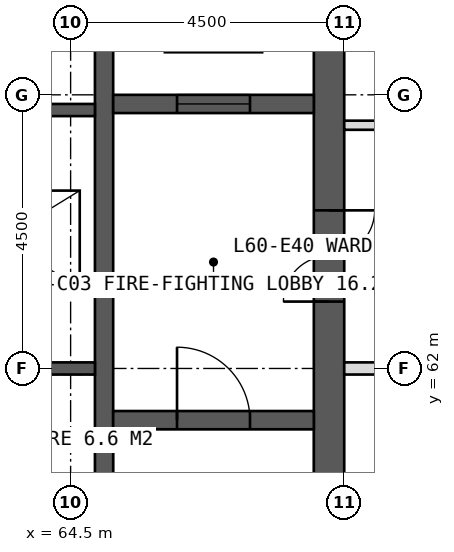
"""IFC4 building model, lengths in metres.
Left out: names, types, materials, properties, quantities, classifications, styles, units other than length and angle.
Written with IfcOpenShell. Run it as: python <this file> out.ifc"""

import sys

from ifc_helpers import new_model, si_unit, direction, frame, frame_2d, origin, place, context, subcontext, project, spatial, rectangle, extrude, element, fill, save


model = new_model("IFC4")
c1 = context("Model", 3, precision=1e-05, world=origin(), true_north=direction((0.0, 1.0)))
c2 = subcontext(c1, "Body", "Model", "MODEL_VIEW")
j1 = project(units=[si_unit("LENGTHUNIT", "METRE"), si_unit("PLANEANGLEUNIT", "RADIAN")], contexts=[c1])
p1 = place(None, origin())
s1 = spatial("IfcSite", under=j1, at=p1, CompositionType="ELEMENT")
p2 = place(p1, origin())
s2 = spatial("IfcBuilding", under=s1, at=p2, CompositionType="ELEMENT")
p3 = place(p2, frame((0.0, 0.0, 250.0)))
s3 = spatial("IfcBuildingStorey", under=s2, at=p3, CompositionType="ELEMENT", Elevation=250.0)
p4 = place(p3, frame((68.75, 53.5, 0.0), z_axis=(0.0, 0.0, 1.0), x_axis=(0.0, 1.0, 0.0)))
e1 = element("IfcWall", 1, at=p4, inside=s3, PredefinedType="SHEAR", context=c2, shape_type="SweptSolid", body=[
    extrude(rectangle(XDim=17.0, YDim=0.5, at=frame_2d((8.5, 0.0))), origin(), (0.0, 0.0, 1.0), 4.0),
])
p5 = place(p4, frame((9.6, 0.0, 0.0)))
e2 = element("IfcOpeningElement", 2, at=p5, cuts=e1, PredefinedType="OPENING", context=c2, shape_type="SweptSolid", body=[
    extrude(rectangle(XDim=1.5, YDim=2.2, at=frame_2d((0.75, 1.1))), frame((0.0, 0.26, 0.0), z_axis=(0.0, -1.0, 0.0), x_axis=(1.0, 0.0, 0.0)), (0.0, 0.0, 1.0), 0.52),
])
p6 = place(p3, frame((65.05, 53.5, 0.0), z_axis=(0.0, 0.0, 1.0), x_axis=(0.0, 1.0, 0.0)))
e3 = element("IfcWall", 3, at=p6, inside=s3, PredefinedType="SHEAR", context=c2, shape_type="SweptSolid", body=[
    extrude(rectangle(XDim=17.0, YDim=0.3, at=frame_2d((8.5, 0.0))), origin(), (0.0, 0.0, 1.0), 4.0),
])
for number, where, z_axis, x_axis in (
    (4, (61.85, 62.0, 0.0), (0.0, 0.0, 1.0), (1.0, 0.0, 0.0)),
    (5, (61.85, 66.25, 0.0), (0.0, 0.0, 1.0), (1.0, 0.0, 0.0)),
):
    element("IfcWall", number, at=place(p3, frame(where, z_axis=z_axis, x_axis=x_axis)), inside=s3, PredefinedType="SHEAR", context=c2, shape_type="SweptSolid", body=[
        extrude(rectangle(XDim=3.05, YDim=0.2, at=frame_2d((1.525, 0.0))), origin(), (0.0, 0.0, 1.0), 4.0),
    ])
p7 = place(p3, frame((65.2, 61.15, 0.0), z_axis=(0.0, 0.0, 1.0), x_axis=(1.0, 0.0, 0.0)))
e6 = element("IfcWall", 6, at=p7, inside=s3, PredefinedType="SHEAR", context=c2, shape_type="SweptSolid", body=[
    extrude(rectangle(XDim=3.3, YDim=0.3, at=frame_2d((1.65, 0.0))), origin(), (0.0, 0.0, 1.0), 4.0),
])
p8 = place(p7, frame((1.05, 0.0, 0.0)))
e7 = element("IfcOpeningElement", 7, at=p8, cuts=e6, PredefinedType="OPENING", context=c2, shape_type="SweptSolid", body=[
    extrude(rectangle(XDim=1.2, YDim=2.1, at=frame_2d((0.6, 1.05))), frame((0.0, 0.16, 0.0), z_axis=(0.0, -1.0, 0.0), x_axis=(1.0, 0.0, 0.0)), (0.0, 0.0, 1.0), 0.32),
])
p9 = place(p3, frame((65.2, 66.35, 0.0), z_axis=(0.0, 0.0, 1.0), x_axis=(1.0, 0.0, 0.0)))
e8 = element("IfcWall", 8, at=p9, inside=s3, PredefinedType="SHEAR", context=c2, shape_type="SweptSolid", body=[
    extrude(rectangle(XDim=3.3, YDim=0.3, at=frame_2d((1.65, 0.0))), origin(), (0.0, 0.0, 1.0), 4.0),
])
p10 = place(p9, frame((1.05, 0.0, 0.0)))
e9 = element("IfcOpeningElement", 9, at=p10, cuts=e8, PredefinedType="OPENING", context=c2, shape_type="SweptSolid", body=[
    extrude(rectangle(XDim=1.2, YDim=2.2, at=frame_2d((0.6, 1.1))), frame((0.0, 0.16, 0.0), z_axis=(0.0, -1.0, 0.0), x_axis=(1.0, 0.0, 0.0)), (0.0, 0.0, 1.0), 0.32),
])
p11 = place(p3, frame((69.0, 66.0, 0.0), z_axis=(0.0, 0.0, 1.0), x_axis=(1.0, 0.0, 0.0)))
e10 = element("IfcWall", 10, at=p11, inside=s3, PredefinedType="PARTITIONING", context=c2, shape_type="SweptSolid", body=[
    extrude(rectangle(XDim=1.5, YDim=0.15, at=frame_2d((0.75, 0.0))), origin(), (0.0, 0.0, 1.0), 3.75),
])
p12 = place(p3, frame((69.0, 62.0, 0.0), z_axis=(0.0, 0.0, 1.0), x_axis=(1.0, 0.0, 0.0)))
e11 = element("IfcWall", 11, at=p12, inside=s3, PredefinedType="SOLIDWALL", context=c2, shape_type="SweptSolid", body=[
    extrude(rectangle(XDim=1.5, YDim=0.2, at=frame_2d((0.75, 0.0))), origin(), (0.0, 0.0, 1.0), 2.75),
])
p13 = place(p5, origin())
e12 = element("IfcDoor", 12, at=p13, inside=s3, OperationType="DOUBLE_DOOR_SINGLE_SWING", PredefinedType="DOOR", context=c2, shape_type="SweptSolid", body=[
    extrude(rectangle(XDim=1.5, YDim=2.2, at=frame_2d((0.75, 1.1))), frame((0.0, 0.025, 0.0), z_axis=(0.0, -1.0, 0.0), x_axis=(1.0, 0.0, 0.0)), (0.0, 0.0, 1.0), 0.05),
])
fill(e2, e12)
p14 = place(p8, origin())
e13 = element("IfcDoor", 13, at=p14, inside=s3, OperationType="SINGLE_SWING_LEFT", PredefinedType="DOOR", context=c2, shape_type="SweptSolid", body=[
    extrude(rectangle(XDim=1.2, YDim=2.1, at=frame_2d((0.6, 1.05))), frame((0.0, 0.025, 0.0), z_axis=(0.0, -1.0, 0.0), x_axis=(1.0, 0.0, 0.0)), (0.0, 0.0, 1.0), 0.05),
])
fill(e7, e13)
p15 = place(p10, origin())
e14 = element("IfcDoor", 14, at=p15, inside=s3, OperationType="SLIDING_TO_LEFT", PredefinedType="DOOR", context=c2, shape_type="SweptSolid", body=[
    extrude(rectangle(XDim=1.2, YDim=2.2, at=frame_2d((0.6, 1.1))), frame((0.0, 0.025, 0.0), z_axis=(0.0, -1.0, 0.0), x_axis=(1.0, 0.0, 0.0)), (0.0, 0.0, 1.0), 0.05),
])
fill(e9, e14)
save(model, sys.argv[1])
